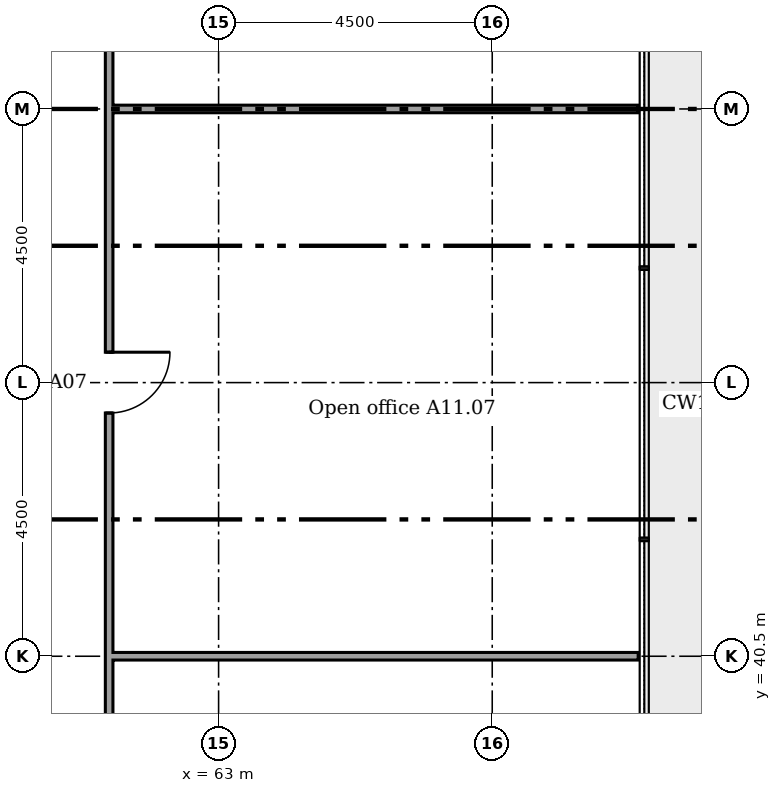
"""IFC4 building model, lengths in metres.
Left out: names, types, materials, properties, quantities, classifications, styles, units other than length and angle.
Written with IfcOpenShell. Run it as: python <this file> out.ifc"""

import sys

from ifc_helpers import new_model, si_unit, direction, frame, frame_2d, origin, place, context, subcontext, project, spatial, rectangle, extrude, element, fill, save


model = new_model("IFC4")
c1 = context("Model", 3, precision=1e-05, world=origin(), true_north=direction((0.0, 1.0)))
c2 = subcontext(c1, "Body", "Model", "MODEL_VIEW")
j1 = project(units=[si_unit("LENGTHUNIT", "METRE"), si_unit("PLANEANGLEUNIT", "RADIAN")], contexts=[c1])
p1 = place(None, origin())
s1 = spatial("IfcSite", under=j1, at=p1, CompositionType="ELEMENT")
p2 = place(p1, origin())
s2 = spatial("IfcBuilding", under=s1, at=p2, CompositionType="ELEMENT")
p3 = place(p2, frame((0.0, 0.0, 51.0)))
s3 = spatial("IfcBuildingStorey", under=s2, at=p3, CompositionType="ELEMENT", Elevation=51.0)
for number, where in (
    (1, (61.2, 40.5, 0.0)),
    (2, (61.2, 49.5, 0.0)),
):
    element("IfcWall", number, at=place(p3, frame(where)), inside=s3, PredefinedType="PARTITIONING", context=c2, shape_type="SweptSolid", body=[
        extrude(rectangle(XDim=8.7, YDim=0.125, at=frame_2d((4.35, 0.0))), origin(), (0.0, 0.0, 1.0), 2.766),
    ])
p4 = place(p3, frame((61.2, 38.462, 0.0), z_axis=(0.0, 0.0, 1.0), x_axis=(0.0, 1.0, 0.0)))
e3 = element("IfcWall", 3, at=p4, inside=s3, PredefinedType="PARTITIONING", context=c2, shape_type="SweptSolid", body=[
    extrude(rectangle(XDim=22.075, YDim=0.125, at=frame_2d((11.038, 0.0))), origin(), (0.0, 0.0, 1.0), 3.45),
])
p5 = place(p4, frame((6.038, 0.0, 0.0)))
e4 = element("IfcOpeningElement", 4, at=p5, cuts=e3, PredefinedType="OPENING", context=c2, shape_type="SweptSolid", body=[
    extrude(rectangle(XDim=1.0, YDim=2.1, at=frame_2d((0.5, 1.05))), frame((0.0, 0.073, 0.0), z_axis=(0.0, -1.0, 0.0), x_axis=(1.0, 0.0, 0.0)), (0.0, 0.0, 1.0), 0.145),
])
p6 = place(p4, frame((12.333, 0.0, 0.0)))
e5 = element("IfcOpeningElement", 5, at=p6, cuts=e3, PredefinedType="OPENING", context=c2, shape_type="SweptSolid", body=[
    extrude(rectangle(XDim=1.0, YDim=2.1, at=frame_2d((0.5, 1.05))), frame((0.0, 0.073, 0.0), z_axis=(0.0, -1.0, 0.0), x_axis=(1.0, 0.0, 0.0)), (0.0, 0.0, 1.0), 0.145),
])
p7 = place(p4, frame((17.742, 0.0, 0.0)))
e6 = element("IfcOpeningElement", 6, at=p7, cuts=e3, PredefinedType="OPENING", context=c2, shape_type="SweptSolid", body=[
    extrude(rectangle(XDim=1.0, YDim=2.1, at=frame_2d((0.5, 1.05))), frame((0.0, 0.073, 0.0), z_axis=(0.0, -1.0, 0.0), x_axis=(1.0, 0.0, 0.0)), (0.0, 0.0, 1.0), 0.145),
])
p8 = place(p5, frame((1.0, 0.0, 0.0), x_axis=(-1.0, 0.0, 0.0)))
e7 = element("IfcDoor", 7, at=p8, inside=s3, OperationType="SINGLE_SWING_RIGHT", PredefinedType="DOOR", context=c2, shape_type="SweptSolid", body=[
    extrude(rectangle(XDim=1.0, YDim=2.1, at=frame_2d((0.5, 1.05))), frame((0.0, 0.025, 0.0), z_axis=(0.0, -1.0, 0.0), x_axis=(1.0, 0.0, 0.0)), (0.0, 0.0, 1.0), 0.05),
])
fill(e4, e7)
save(model, sys.argv[1])
